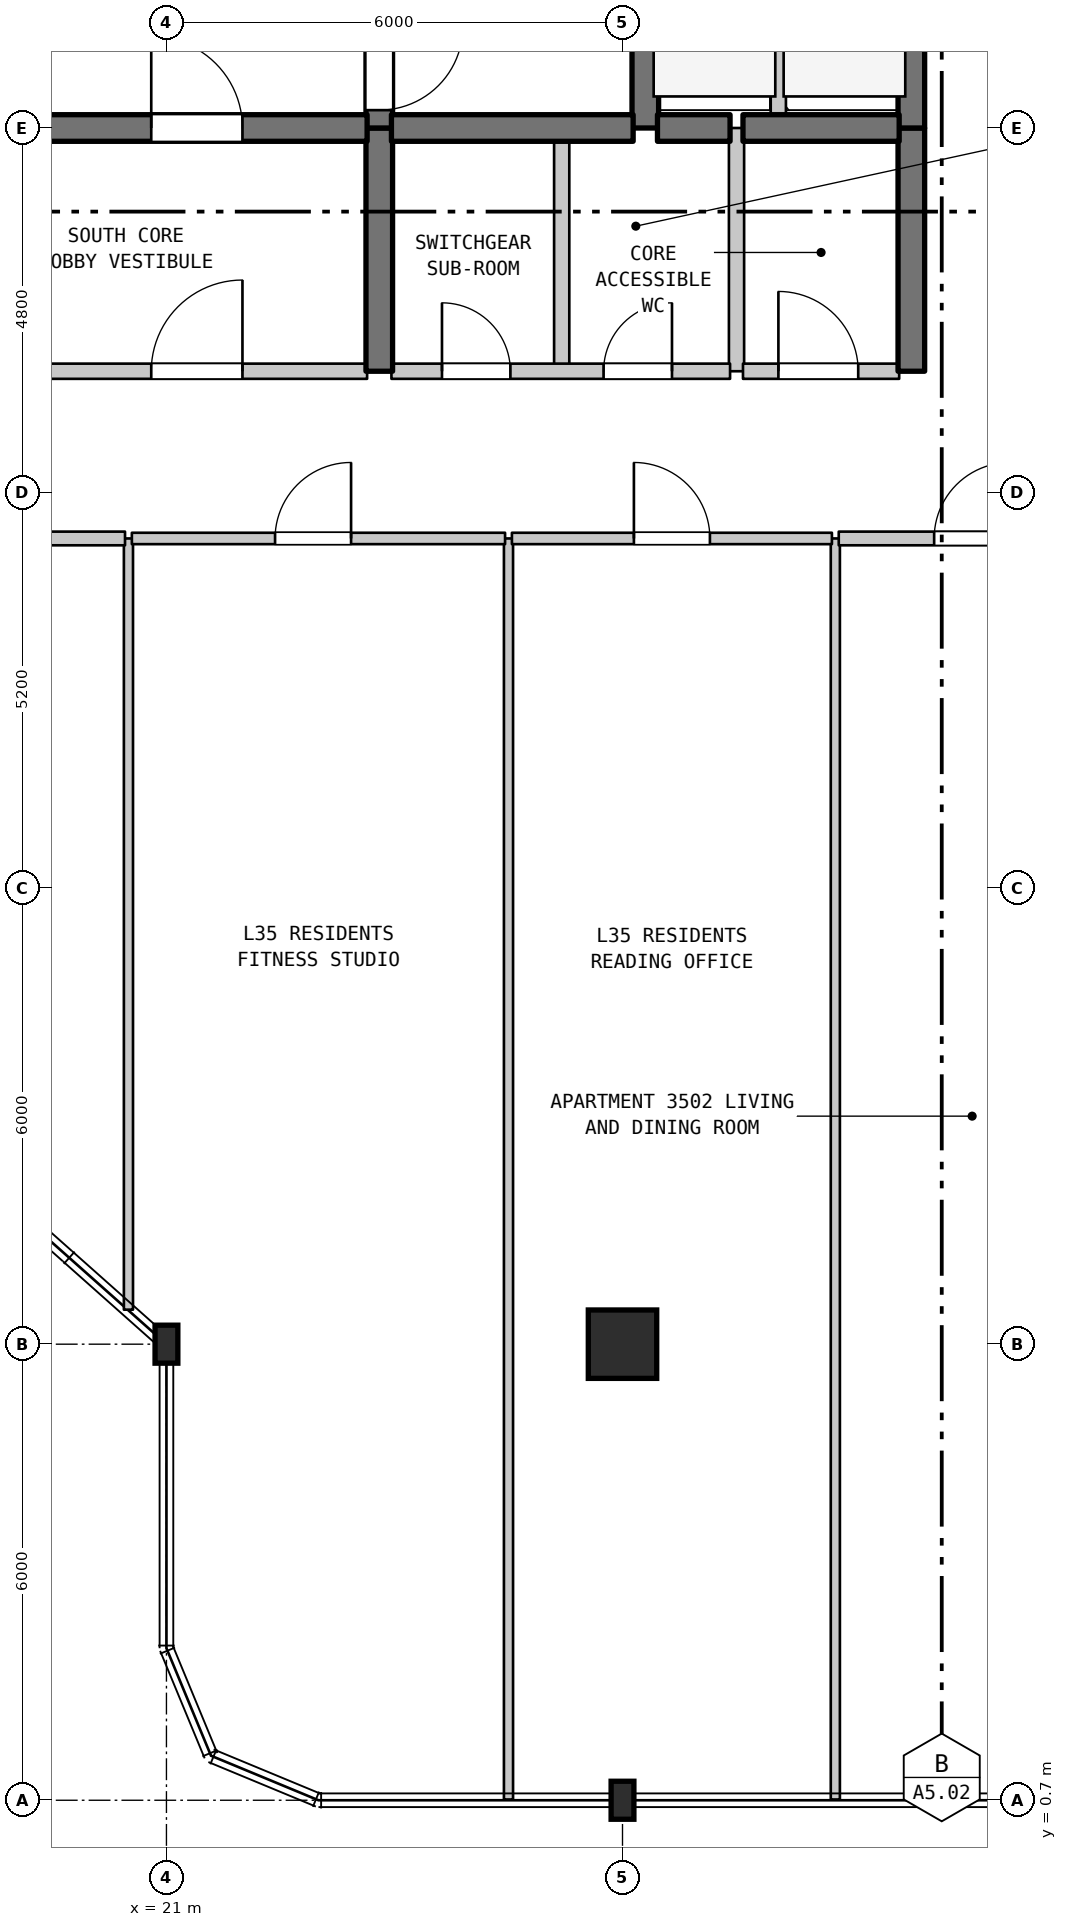
"""IFC4 building model, lengths in metres.
Left out: names, types, materials, properties, quantities, classifications, styles, units other than length and angle.
Written with IfcOpenShell. Run it as: python <this file> out.ifc"""

import sys

from ifc_helpers import new_model, si_unit, direction, frame, frame_2d, origin, origin_2d, place, context, subcontext, project, spatial, rectangle, i_section, extrude, element, fill, save


model = new_model("IFC4")
c1 = context("Model", 3, precision=1e-05, world=origin(), true_north=direction((0.0, 1.0)))
c2 = subcontext(c1, "Body", "Model", "MODEL_VIEW")
j1 = project(units=[si_unit("LENGTHUNIT", "METRE"), si_unit("PLANEANGLEUNIT", "RADIAN")], contexts=[c1])
p1 = place(None, origin())
s1 = spatial("IfcSite", under=j1, at=p1, CompositionType="ELEMENT")
p2 = place(p1, origin())
s2 = spatial("IfcBuilding", under=s1, at=p2, CompositionType="ELEMENT")
p3 = place(p2, frame((0.0, 0.0, 144.6)))
s3 = spatial("IfcBuildingStorey", under=s2, at=p3, CompositionType="ELEMENT", Elevation=144.6)
for number, where, z_axis, x_axis in (
    (1, (21.0, 6.7, 0.0), (0.0, 0.0, 1.0), (1.0, 0.0, 0.0)),
    (2, (27.0, 0.7, 0.0), (0.0, 0.0, 1.0), (1.0, 0.0, 0.0)),
):
    element("IfcColumn", number, at=place(p3, frame(where, z_axis=z_axis, x_axis=x_axis)), inside=s3, PredefinedType="COLUMN", context=c2, shape_type="SweptSolid", body=[
        extrude(i_section(OverallWidth=0.3, OverallDepth=0.5, WebThickness=0.014, FlangeThickness=0.028, FilletRadius=0.027, at=origin_2d()), origin(), (0.0, 0.0, 1.0), 3.7),
    ])
p4 = place(p3, frame((27.0, 6.7, 0.0), z_axis=(0.0, 0.0, 1.0), x_axis=(1.0, 0.0, 0.0)))
e3 = element("IfcColumn", 3, at=p4, inside=s3, PredefinedType="COLUMN", context=c2, shape_type="SweptSolid", body=[
    extrude(rectangle(XDim=0.9, YDim=0.9, at=origin_2d()), origin(), (0.0, 0.0, 1.0), 3.7),
])
p5 = place(p3, frame((20.5, 7.154, 0.0), z_axis=(0.0, 0.0, 1.0), x_axis=(0.0, 1.0, 0.0)))
e4 = element("IfcWall", 4, at=p5, inside=s3, PredefinedType="PARTITIONING", context=c2, shape_type="SweptSolid", body=[
    extrude(rectangle(XDim=10.146, YDim=0.12, at=frame_2d((5.073, 0.0))), origin(), (0.0, 0.0, 1.0), 3.385),
])
p6 = place(p3, frame((23.8, 19.5, 0.0), z_axis=(0.0, 0.0, 1.0), x_axis=(0.0, 1.0, 0.0)))
e5 = element("IfcWall", 5, at=p6, inside=s3, PredefinedType="SHEAR", context=c2, shape_type="SweptSolid", body=[
    extrude(rectangle(XDim=3.2, YDim=0.35, at=frame_2d((1.6, 0.0))), origin(), (0.0, 0.0, 1.0), 3.385),
])
p7 = place(p3, frame((23.8, 22.7, 0.0), z_axis=(0.0, 0.0, 1.0), x_axis=(0.0, 1.0, 0.0)))
e6 = element("IfcWall", 6, at=p7, inside=s3, PredefinedType="SHEAR", context=c2, shape_type="SweptSolid", body=[
    extrude(rectangle(XDim=5.5, YDim=0.35, at=frame_2d((2.75, 0.0))), origin(), (0.0, 0.0, 1.0), 3.385),
])
p8 = place(p7, frame((0.235, 0.0, 0.0)))
e7 = element("IfcOpeningElement", 7, at=p8, cuts=e6, PredefinedType="OPENING", context=c2, shape_type="SweptSolid", body=[
    extrude(rectangle(XDim=1.1, YDim=2.15, at=frame_2d((0.55, 1.075))), frame((0.0, 0.185, 0.0), z_axis=(0.0, -1.0, 0.0), x_axis=(1.0, 0.0, 0.0)), (0.0, 0.0, 1.0), 0.37),
])
p9 = place(p3, frame((25.5, 0.71, 0.0), z_axis=(0.0, 0.0, 1.0), x_axis=(0.0, 1.0, 0.0)))
e8 = element("IfcWall", 8, at=p9, inside=s3, PredefinedType="PARTITIONING", context=c2, shape_type="SweptSolid", body=[
    extrude(rectangle(XDim=16.59, YDim=0.12, at=frame_2d((8.295, 0.0))), origin(), (0.0, 0.0, 1.0), 3.385),
])
p10 = place(p3, frame((26.2, 19.5, 0.0), z_axis=(0.0, 0.0, 1.0), x_axis=(0.0, 1.0, 0.0)))
e9 = element("IfcWall", 9, at=p10, inside=s3, PredefinedType="STANDARD", context=c2, shape_type="SweptSolid", body=[
    extrude(rectangle(XDim=3.2, YDim=0.2, at=frame_2d((1.6, 0.0))), origin(), (0.0, 0.0, 1.0), 3.385),
])
p11 = place(p3, frame((27.3, 22.7, 0.0), z_axis=(0.0, 0.0, 1.0), x_axis=(0.0, 1.0, 0.0)))
e10 = element("IfcWall", 10, at=p11, inside=s3, PredefinedType="SHEAR", context=c2, shape_type="SweptSolid", body=[
    extrude(rectangle(XDim=2.9, YDim=0.35, at=frame_2d((1.45, 0.0))), origin(), (0.0, 0.0, 1.0), 3.385),
])
p12 = place(p3, frame((28.5, 19.5, 0.0), z_axis=(0.0, 0.0, 1.0), x_axis=(0.0, 1.0, 0.0)))
e11 = element("IfcWall", 11, at=p12, inside=s3, PredefinedType="STANDARD", context=c2, shape_type="SweptSolid", body=[
    extrude(rectangle(XDim=3.2, YDim=0.2, at=frame_2d((1.6, 0.0))), origin(), (0.0, 0.0, 1.0), 3.385),
])
p13 = place(p3, frame((29.05, 22.7, 0.0), z_axis=(0.0, 0.0, 1.0), x_axis=(0.0, 1.0, 0.0)))
e12 = element("IfcWall", 12, at=p13, inside=s3, PredefinedType="STANDARD", context=c2, shape_type="SweptSolid", body=[
    extrude(rectangle(XDim=2.9, YDim=0.2, at=frame_2d((1.45, 0.0))), origin(), (0.0, 0.0, 1.0), 3.385),
])
p14 = place(p3, frame((29.8, 0.71, 0.0), z_axis=(0.0, 0.0, 1.0), x_axis=(0.0, 1.0, 0.0)))
e13 = element("IfcWall", 13, at=p14, inside=s3, PredefinedType="PARTITIONING", context=c2, shape_type="SweptSolid", body=[
    extrude(rectangle(XDim=16.59, YDim=0.12, at=frame_2d((8.295, 0.0))), origin(), (0.0, 0.0, 1.0), 3.385),
])
p15 = place(p3, frame((30.8, 19.5, 0.0), z_axis=(0.0, 0.0, 1.0), x_axis=(0.0, 1.0, 0.0)))
e14 = element("IfcWall", 14, at=p15, inside=s3, PredefinedType="SHEAR", context=c2, shape_type="SweptSolid", body=[
    extrude(rectangle(XDim=3.2, YDim=0.35, at=frame_2d((1.6, 0.0))), origin(), (0.0, 0.0, 1.0), 3.385),
])
p16 = place(p3, frame((30.8, 22.7, 0.0), z_axis=(0.0, 0.0, 1.0), x_axis=(0.0, 1.0, 0.0)))
e15 = element("IfcWall", 15, at=p16, inside=s3, PredefinedType="SHEAR", context=c2, shape_type="SweptSolid", body=[
    extrude(rectangle(XDim=2.9, YDim=0.35, at=frame_2d((1.45, 0.0))), origin(), (0.0, 0.0, 1.0), 3.385),
])
p17 = place(p3, frame((18.595, 17.3, 0.0), z_axis=(0.0, 0.0, 1.0), x_axis=(1.0, 0.0, 0.0)))
e16 = element("IfcWall", 16, at=p17, inside=s3, PredefinedType="STANDARD", context=c2, shape_type="SweptSolid", body=[
    extrude(rectangle(XDim=1.86, YDim=0.18, at=frame_2d((0.93, 0.0))), origin(), (0.0, 0.0, 1.0), 3.385),
])
p18 = place(p3, frame((20.545, 17.3, 0.0), z_axis=(0.0, 0.0, 1.0), x_axis=(1.0, 0.0, 0.0)))
e17 = element("IfcWall", 17, at=p18, inside=s3, PredefinedType="STANDARD", context=c2, shape_type="SweptSolid", body=[
    extrude(rectangle(XDim=4.91, YDim=0.15, at=frame_2d((2.455, 0.0))), origin(), (0.0, 0.0, 1.0), 3.385),
])
p19 = place(p18, frame((1.884, 0.0, 0.0)))
e18 = element("IfcOpeningElement", 18, at=p19, cuts=e17, PredefinedType="OPENING", context=c2, shape_type="SweptSolid", body=[
    extrude(rectangle(XDim=1.0, YDim=2.15, at=frame_2d((0.5, 1.075))), frame((0.0, 0.085, 0.0), z_axis=(0.0, -1.0, 0.0), x_axis=(1.0, 0.0, 0.0)), (0.0, 0.0, 1.0), 0.17),
])
p20 = place(p3, frame((25.545, 17.3, 0.0), z_axis=(0.0, 0.0, 1.0), x_axis=(1.0, 0.0, 0.0)))
e19 = element("IfcWall", 19, at=p20, inside=s3, PredefinedType="STANDARD", context=c2, shape_type="SweptSolid", body=[
    extrude(rectangle(XDim=4.21, YDim=0.15, at=frame_2d((2.105, 0.0))), origin(), (0.0, 0.0, 1.0), 3.385),
])
p21 = place(p20, frame((1.605, 0.0, 0.0)))
e20 = element("IfcOpeningElement", 20, at=p21, cuts=e19, PredefinedType="OPENING", context=c2, shape_type="SweptSolid", body=[
    extrude(rectangle(XDim=1.0, YDim=2.15, at=frame_2d((0.5, 1.075))), frame((0.0, 0.085, 0.0), z_axis=(0.0, -1.0, 0.0), x_axis=(1.0, 0.0, 0.0)), (0.0, 0.0, 1.0), 0.17),
])
p22 = place(p3, frame((29.845, 17.3, 0.0), z_axis=(0.0, 0.0, 1.0), x_axis=(1.0, 0.0, 0.0)))
e21 = element("IfcWall", 21, at=p22, inside=s3, PredefinedType="STANDARD", context=c2, shape_type="SweptSolid", body=[
    extrude(rectangle(XDim=3.51, YDim=0.18, at=frame_2d((1.755, 0.0))), origin(), (0.0, 0.0, 1.0), 3.385),
])
p23 = place(p22, frame((1.255, 0.0, 0.0)))
e22 = element("IfcOpeningElement", 22, at=p23, cuts=e21, PredefinedType="OPENING", context=c2, shape_type="SweptSolid", body=[
    extrude(rectangle(XDim=1.0, YDim=2.15, at=frame_2d((0.5, 1.075))), frame((0.0, 0.1, 0.0), z_axis=(0.0, -1.0, 0.0), x_axis=(1.0, 0.0, 0.0)), (0.0, 0.0, 1.0), 0.2),
])
p24 = place(p3, frame((19.16, 19.5, 0.0), z_axis=(0.0, 0.0, 1.0), x_axis=(1.0, 0.0, 0.0)))
e23 = element("IfcWall", 23, at=p24, inside=s3, PredefinedType="STANDARD", context=c2, shape_type="SweptSolid", body=[
    extrude(rectangle(XDim=4.48, YDim=0.2, at=frame_2d((2.24, 0.0))), origin(), (0.0, 0.0, 1.0), 3.385),
])
p25 = place(p24, frame((1.64, 0.0, 0.0)))
e24 = element("IfcOpeningElement", 24, at=p25, cuts=e23, PredefinedType="OPENING", context=c2, shape_type="SweptSolid", body=[
    extrude(rectangle(XDim=1.2, YDim=2.2, at=frame_2d((0.6, 1.1))), frame((0.0, 0.11, 0.0), z_axis=(0.0, -1.0, 0.0), x_axis=(1.0, 0.0, 0.0)), (0.0, 0.0, 1.0), 0.22),
])
p26 = place(p3, frame((23.96, 19.5, 0.0), z_axis=(0.0, 0.0, 1.0), x_axis=(1.0, 0.0, 0.0)))
e25 = element("IfcWall", 25, at=p26, inside=s3, PredefinedType="STANDARD", context=c2, shape_type="SweptSolid", body=[
    extrude(rectangle(XDim=4.455, YDim=0.2, at=frame_2d((2.228, 0.0))), origin(), (0.0, 0.0, 1.0), 3.385),
])
p27 = place(p26, frame((0.665, 0.0, 0.0)))
e26 = element("IfcOpeningElement", 26, at=p27, cuts=e25, PredefinedType="OPENING", context=c2, shape_type="SweptSolid", body=[
    extrude(rectangle(XDim=0.9, YDim=2.15, at=frame_2d((0.45, 1.075))), frame((0.0, 0.11, 0.0), z_axis=(0.0, -1.0, 0.0), x_axis=(1.0, 0.0, 0.0)), (0.0, 0.0, 1.0), 0.22),
])
p28 = place(p26, frame((2.791, 0.0, 0.0)))
e27 = element("IfcOpeningElement", 27, at=p28, cuts=e25, PredefinedType="OPENING", context=c2, shape_type="SweptSolid", body=[
    extrude(rectangle(XDim=0.9, YDim=2.15, at=frame_2d((0.45, 1.075))), frame((0.0, 0.11, 0.0), z_axis=(0.0, -1.0, 0.0), x_axis=(1.0, 0.0, 0.0)), (0.0, 0.0, 1.0), 0.22),
])
p29 = place(p3, frame((28.585, 19.5, 0.0), z_axis=(0.0, 0.0, 1.0), x_axis=(1.0, 0.0, 0.0)))
e28 = element("IfcWall", 28, at=p29, inside=s3, PredefinedType="STANDARD", context=c2, shape_type="SweptSolid", body=[
    extrude(rectangle(XDim=2.055, YDim=0.2, at=frame_2d((1.027, 0.0))), origin(), (0.0, 0.0, 1.0), 3.385),
])
p30 = place(p29, frame((0.466, 0.0, 0.0)))
e29 = element("IfcOpeningElement", 29, at=p30, cuts=e28, PredefinedType="OPENING", context=c2, shape_type="SweptSolid", body=[
    extrude(rectangle(XDim=1.05, YDim=2.15, at=frame_2d((0.525, 1.075))), frame((0.0, 0.11, 0.0), z_axis=(0.0, -1.0, 0.0), x_axis=(1.0, 0.0, 0.0)), (0.0, 0.0, 1.0), 0.22),
])
p31 = place(p3, frame((19.16, 22.7, 0.0), z_axis=(0.0, 0.0, 1.0), x_axis=(1.0, 0.0, 0.0)))
e30 = element("IfcWall", 30, at=p31, inside=s3, PredefinedType="SHEAR", context=c2, shape_type="SweptSolid", body=[
    extrude(rectangle(XDim=4.48, YDim=0.35, at=frame_2d((2.24, 0.0))), origin(), (0.0, 0.0, 1.0), 3.385),
])
p32 = place(p31, frame((1.64, 0.0, 0.0)))
e31 = element("IfcOpeningElement", 31, at=p32, cuts=e30, PredefinedType="OPENING", context=c2, shape_type="SweptSolid", body=[
    extrude(rectangle(XDim=1.2, YDim=2.2, at=frame_2d((0.6, 1.1))), frame((0.0, 0.185, 0.0), z_axis=(0.0, -1.0, 0.0), x_axis=(1.0, 0.0, 0.0)), (0.0, 0.0, 1.0), 0.37),
])
p33 = place(p3, frame((23.96, 22.7, 0.0), z_axis=(0.0, 0.0, 1.0), x_axis=(1.0, 0.0, 0.0)))
e32 = element("IfcWall", 32, at=p33, inside=s3, PredefinedType="SHEAR", context=c2, shape_type="SweptSolid", body=[
    extrude(rectangle(XDim=3.18, YDim=0.35, at=frame_2d((1.59, 0.0))), origin(), (0.0, 0.0, 1.0), 3.385),
])
p34 = place(p3, frame((27.46, 22.7, 0.0), z_axis=(0.0, 0.0, 1.0), x_axis=(1.0, 0.0, 0.0)))
e33 = element("IfcWall", 33, at=p34, inside=s3, PredefinedType="SHEAR", context=c2, shape_type="SweptSolid", body=[
    extrude(rectangle(XDim=0.955, YDim=0.35, at=frame_2d((0.478, 0.0))), origin(), (0.0, 0.0, 1.0), 3.385),
])
p35 = place(p3, frame((28.585, 22.7, 0.0), z_axis=(0.0, 0.0, 1.0), x_axis=(1.0, 0.0, 0.0)))
e34 = element("IfcWall", 34, at=p35, inside=s3, PredefinedType="SHEAR", context=c2, shape_type="SweptSolid", body=[
    extrude(rectangle(XDim=2.055, YDim=0.35, at=frame_2d((1.027, 0.0))), origin(), (0.0, 0.0, 1.0), 3.385),
])
p36 = place(p8, frame((1.1, 0.0, 0.0), z_axis=(0.0, 0.0, 1.0), x_axis=(-1.0, 0.0, 0.0)))
e35 = element("IfcDoor", 35, at=p36, inside=s3, OperationType="SINGLE_SWING_RIGHT", PredefinedType="DOOR", context=c2, shape_type="SweptSolid", body=[
    extrude(rectangle(XDim=1.1, YDim=2.15, at=frame_2d((0.55, 1.075))), frame((0.0, 0.025, 0.0), z_axis=(0.0, -1.0, 0.0), x_axis=(1.0, 0.0, 0.0)), (0.0, 0.0, 1.0), 0.05),
])
fill(e7, e35)
p37 = place(p19, origin())
e36 = element("IfcDoor", 36, at=p37, inside=s3, OperationType="SINGLE_SWING_RIGHT", PredefinedType="DOOR", context=c2, shape_type="SweptSolid", body=[
    extrude(rectangle(XDim=1.0, YDim=2.15, at=frame_2d((0.5, 1.075))), frame((0.0, 0.025, 0.0), z_axis=(0.0, -1.0, 0.0), x_axis=(1.0, 0.0, 0.0)), (0.0, 0.0, 1.0), 0.05),
])
fill(e18, e36)
p38 = place(p21, origin())
e37 = element("IfcDoor", 37, at=p38, inside=s3, OperationType="SINGLE_SWING_LEFT", PredefinedType="DOOR", context=c2, shape_type="SweptSolid", body=[
    extrude(rectangle(XDim=1.0, YDim=2.15, at=frame_2d((0.5, 1.075))), frame((0.0, 0.025, 0.0), z_axis=(0.0, -1.0, 0.0), x_axis=(1.0, 0.0, 0.0)), (0.0, 0.0, 1.0), 0.05),
])
fill(e20, e37)
p39 = place(p23, origin())
e38 = element("IfcDoor", 38, at=p39, inside=s3, OperationType="SINGLE_SWING_RIGHT", PredefinedType="DOOR", context=c2, shape_type="SweptSolid", body=[
    extrude(rectangle(XDim=1.0, YDim=2.15, at=frame_2d((0.5, 1.075))), frame((0.0, 0.025, 0.0), z_axis=(0.0, -1.0, 0.0), x_axis=(1.0, 0.0, 0.0)), (0.0, 0.0, 1.0), 0.05),
])
fill(e22, e38)
p40 = place(p25, origin())
e39 = element("IfcDoor", 39, at=p40, inside=s3, OperationType="SINGLE_SWING_RIGHT", PredefinedType="DOOR", context=c2, shape_type="SweptSolid", body=[
    extrude(rectangle(XDim=1.2, YDim=2.2, at=frame_2d((0.6, 1.1))), frame((0.0, 0.025, 0.0), z_axis=(0.0, -1.0, 0.0), x_axis=(1.0, 0.0, 0.0)), (0.0, 0.0, 1.0), 0.05),
])
fill(e24, e39)
p41 = place(p27, origin())
e40 = element("IfcDoor", 40, at=p41, inside=s3, OperationType="SINGLE_SWING_LEFT", PredefinedType="DOOR", context=c2, shape_type="SweptSolid", body=[
    extrude(rectangle(XDim=0.9, YDim=2.15, at=frame_2d((0.45, 1.075))), frame((0.0, 0.025, 0.0), z_axis=(0.0, -1.0, 0.0), x_axis=(1.0, 0.0, 0.0)), (0.0, 0.0, 1.0), 0.05),
])
fill(e26, e40)
p42 = place(p28, origin())
e41 = element("IfcDoor", 41, at=p42, inside=s3, OperationType="SINGLE_SWING_RIGHT", PredefinedType="DOOR", context=c2, shape_type="SweptSolid", body=[
    extrude(rectangle(XDim=0.9, YDim=2.15, at=frame_2d((0.45, 1.075))), frame((0.0, 0.025, 0.0), z_axis=(0.0, -1.0, 0.0), x_axis=(1.0, 0.0, 0.0)), (0.0, 0.0, 1.0), 0.05),
])
fill(e27, e41)
p43 = place(p30, origin())
e42 = element("IfcDoor", 42, at=p43, inside=s3, OperationType="SINGLE_SWING_LEFT", PredefinedType="DOOR", context=c2, shape_type="SweptSolid", body=[
    extrude(rectangle(XDim=1.05, YDim=2.15, at=frame_2d((0.525, 1.075))), frame((0.0, 0.025, 0.0), z_axis=(0.0, -1.0, 0.0), x_axis=(1.0, 0.0, 0.0)), (0.0, 0.0, 1.0), 0.05),
])
fill(e29, e42)
p44 = place(p32, origin())
e43 = element("IfcDoor", 43, at=p44, inside=s3, OperationType="SINGLE_SWING_LEFT", PredefinedType="DOOR", context=c2, shape_type="SweptSolid", body=[
    extrude(rectangle(XDim=1.2, YDim=2.2, at=frame_2d((0.6, 1.1))), frame((0.0, 0.025, 0.0), z_axis=(0.0, -1.0, 0.0), x_axis=(1.0, 0.0, 0.0)), (0.0, 0.0, 1.0), 0.05),
])
fill(e31, e43)
save(model, sys.argv[1])
